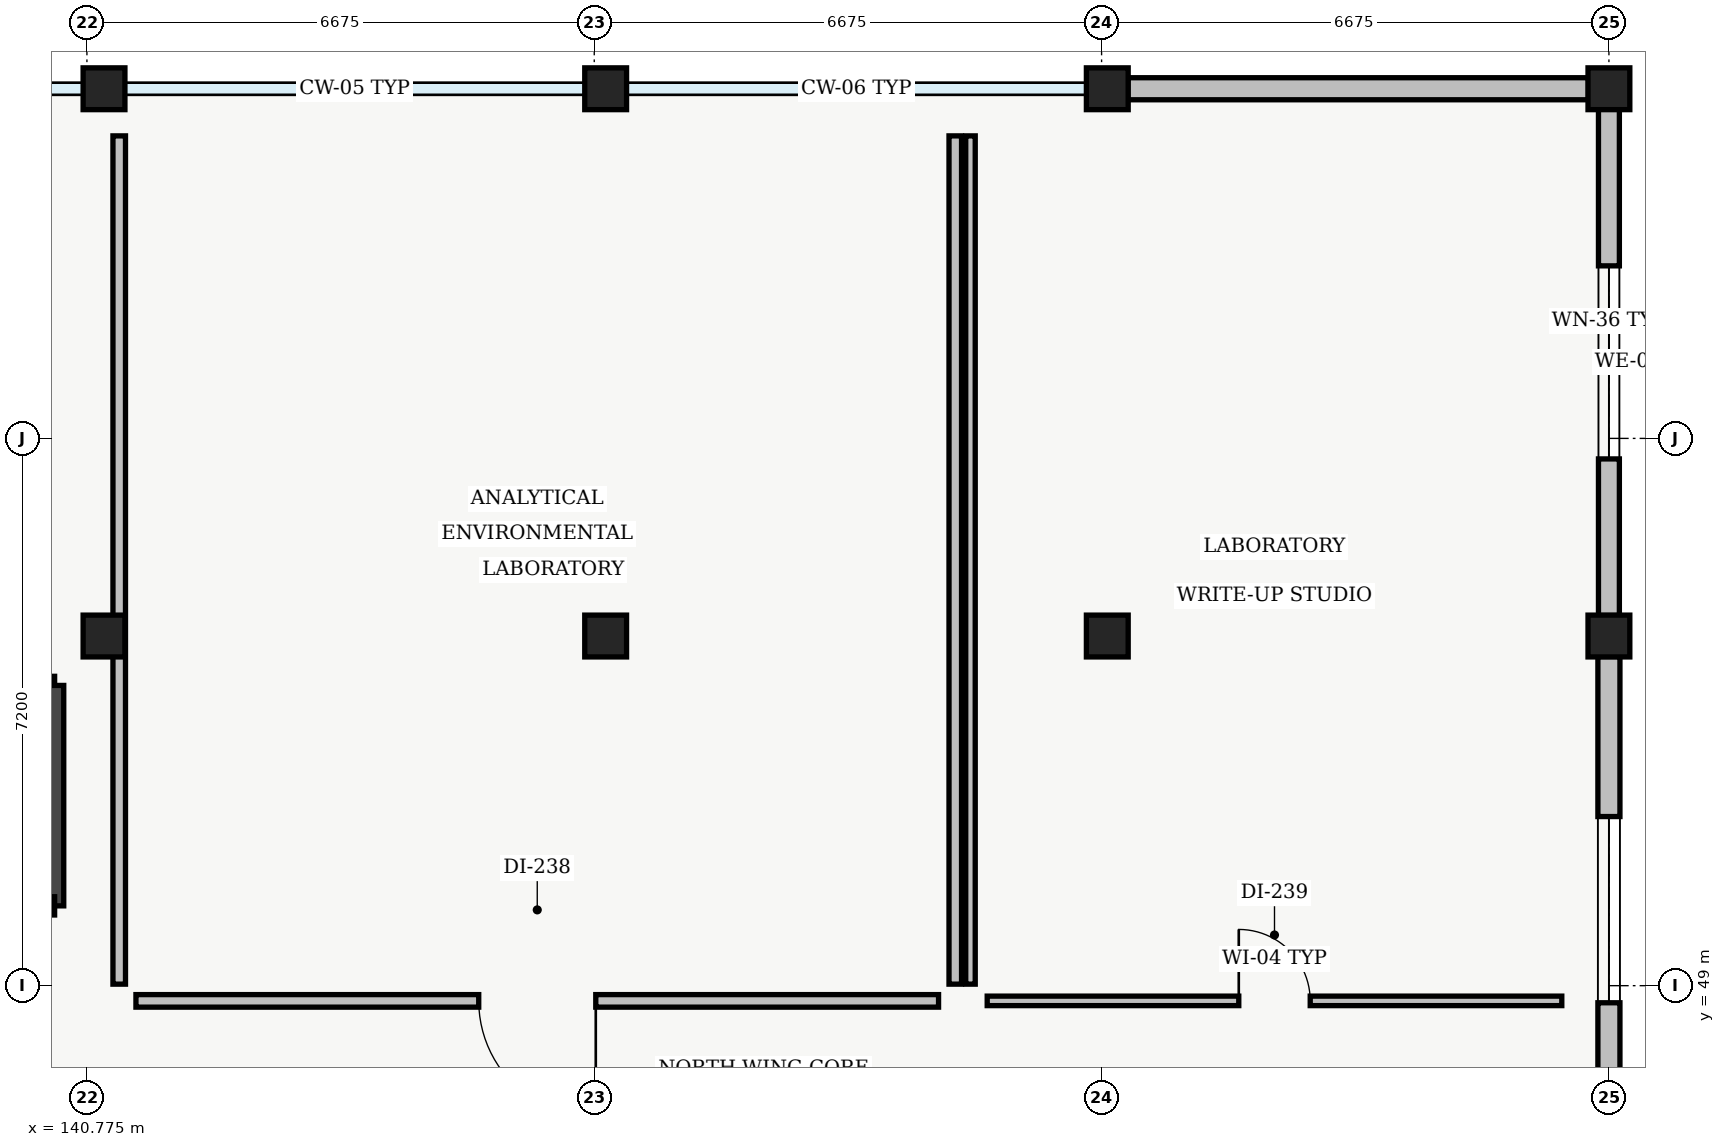
"""IFC4 building model, lengths in metres.
Left out: names, types, materials, properties, quantities, classifications, styles, units other than length and angle.
Written with IfcOpenShell. Run it as: python <this file> out.ifc"""

import sys

from ifc_helpers import new_model, si_unit, direction, frame, frame_2d, origin, origin_2d, place, context, subcontext, project, spatial, rectangle, extrude, element, fill, save


model = new_model("IFC4")
c1 = context("Model", 3, precision=1e-05, world=origin(), true_north=direction((0.0, 1.0)))
c2 = subcontext(c1, "Body", "Model", "MODEL_VIEW")
j1 = project(units=[si_unit("LENGTHUNIT", "METRE"), si_unit("PLANEANGLEUNIT", "RADIAN")], contexts=[c1])
p1 = place(None, origin())
s1 = spatial("IfcSite", under=j1, at=p1, CompositionType="ELEMENT")
p2 = place(p1, origin())
s2 = spatial("IfcBuilding", under=s1, at=p2, CompositionType="ELEMENT")
p3 = place(p2, frame((0.0, 0.0, 23.1)))
s3 = spatial("IfcBuildingStorey", under=s2, at=p3, CompositionType="ELEMENT", Elevation=23.1)
for number, where, z_axis, x_axis in (
    (1, (141.0, 53.6, 0.0), (0.0, 0.0, 1.0), (1.0, 0.0, 0.0)),
    (2, (141.0, 60.8, 0.0), (0.0, 0.0, 1.0), (1.0, 0.0, 0.0)),
    (3, (147.6, 53.6, 0.0), (0.0, 0.0, 1.0), (1.0, 0.0, 0.0)),
    (4, (147.6, 60.8, 0.0), (0.0, 0.0, 1.0), (1.0, 0.0, 0.0)),
    (5, (154.2, 53.6, 0.0), (0.0, 0.0, 1.0), (1.0, 0.0, 0.0)),
    (6, (154.2, 60.8, 0.0), (0.0, 0.0, 1.0), (1.0, 0.0, 0.0)),
    (7, (160.8, 53.6, 0.0), (0.0, 0.0, 1.0), (1.0, 0.0, 0.0)),
    (8, (160.8, 60.8, 0.0), (0.0, 0.0, 1.0), (1.0, 0.0, 0.0)),
):
    element("IfcColumn", number, at=place(p3, frame(where, z_axis=z_axis, x_axis=x_axis)), inside=s3, PredefinedType="COLUMN", context=c2, shape_type="SweptSolid", body=[
        extrude(rectangle(XDim=0.55, YDim=0.55, at=origin_2d()), origin(), (0.0, 0.0, 1.0), 4.29),
    ])
p4 = place(p3, frame((154.47, 60.8, 0.0), z_axis=(0.0, 0.0, 1.0), x_axis=(1.0, 0.0, 0.0)))
e9 = element("IfcWall", 9, at=p4, inside=s3, PredefinedType="STANDARD", context=c2, shape_type="SweptSolid", body=[
    extrude(rectangle(XDim=6.06, YDim=0.29, at=frame_2d((3.03, 0.0))), origin(), (0.0, 0.0, 1.0), 3.775),
])
p5 = place(p3, frame((160.8, 60.53, 0.0), z_axis=(0.0, 0.0, 1.0), x_axis=(0.0, -1.0, 0.0)))
e10 = element("IfcWall", 10, at=p5, inside=s3, PredefinedType="STANDARD", context=c2, shape_type="SweptSolid", body=[
    extrude(rectangle(XDim=6.66, YDim=0.275, at=frame_2d((3.33, 0.0))), origin(), (0.0, 0.0, 1.0), 3.775),
])
p6 = place(p5, frame((2.06, 0.0, 0.95)))
e11 = element("IfcOpeningElement", 11, at=p6, cuts=e10, PredefinedType="OPENING", context=c2, shape_type="SweptSolid", body=[
    extrude(rectangle(XDim=2.54, YDim=1.4, at=frame_2d((1.27, 0.7))), frame((0.0, 0.137, 0.0), z_axis=(0.0, -1.0, 0.0), x_axis=(1.0, 0.0, 0.0)), (0.0, 0.0, 1.0), 0.275),
])
p7 = place(p3, frame((160.8, 53.33, 0.0), z_axis=(0.0, 0.0, 1.0), x_axis=(0.0, -1.0, 0.0)))
e12 = element("IfcWall", 12, at=p7, inside=s3, PredefinedType="STANDARD", context=c2, shape_type="SweptSolid", body=[
    extrude(rectangle(XDim=6.66, YDim=0.29, at=frame_2d((3.33, 0.0))), origin(), (0.0, 0.0, 1.0), 3.775),
])
p8 = place(p7, frame((2.105, 0.0, 0.95)))
e13 = element("IfcOpeningElement", 13, at=p8, cuts=e12, PredefinedType="OPENING", context=c2, shape_type="SweptSolid", body=[
    extrude(rectangle(XDim=2.45, YDim=1.38, at=frame_2d((1.225, 0.69))), frame((0.0, 0.145, 0.0), z_axis=(0.0, -1.0, 0.0), x_axis=(1.0, 0.0, 0.0)), (0.0, 0.0, 1.0), 0.29),
])
p9 = place(p3, frame((138.05, 52.95, 0.0), z_axis=(0.0, 0.0, 1.0), x_axis=(1.0, 0.0, 0.0)))
e14 = element("IfcWall", 14, at=p9, inside=s3, PredefinedType="SHEAR", context=c2, shape_type="SweptSolid", body=[
    extrude(rectangle(XDim=2.3, YDim=0.24, at=frame_2d((1.15, 0.0))), origin(), (0.0, 0.0, 1.0), 4.28),
])
p10 = place(p3, frame((140.35, 52.95, 0.0), z_axis=(0.0, 0.0, 1.0), x_axis=(0.0, -1.0, 0.0)))
e15 = element("IfcWall", 15, at=p10, inside=s3, PredefinedType="SHEAR", context=c2, shape_type="SweptSolid", body=[
    extrude(rectangle(XDim=2.9, YDim=0.24, at=frame_2d((1.45, 0.0))), origin(), (0.0, 0.0, 1.0), 4.28),
])
p11 = place(p3, frame((140.35, 50.05, 0.0), z_axis=(0.0, 0.0, 1.0), x_axis=(-1.0, 0.0, 0.0)))
e16 = element("IfcWall", 16, at=p11, inside=s3, PredefinedType="SHEAR", context=c2, shape_type="SweptSolid", body=[
    extrude(rectangle(XDim=2.3, YDim=0.24, at=frame_2d((1.15, 0.0))), origin(), (0.0, 0.0, 1.0), 4.28),
])
p12 = place(p11, frame((0.425, 0.0, 0.0)))
e17 = element("IfcOpeningElement", 17, at=p12, cuts=e16, PredefinedType="OPENING", context=c2, shape_type="SweptSolid", body=[
    extrude(rectangle(XDim=1.45, YDim=2.3, at=frame_2d((0.725, 1.15))), frame((0.0, 0.12, 0.0), z_axis=(0.0, -1.0, 0.0), x_axis=(1.0, 0.0, 0.0)), (0.0, 0.0, 1.0), 0.24),
])
p13 = place(p3, frame((141.42, 48.8, 0.0), z_axis=(0.0, 0.0, 1.0), x_axis=(1.0, 0.0, 0.0)))
e18 = element("IfcWall", 18, at=p13, inside=s3, PredefinedType="PARTITIONING", context=c2, shape_type="SweptSolid", body=[
    extrude(rectangle(XDim=10.56, YDim=0.165, at=frame_2d((5.28, 0.0))), origin(), (0.0, 0.0, 1.0), 3.825),
])
p14 = place(p13, frame((4.51, 0.0, 0.0)))
e19 = element("IfcOpeningElement", 19, at=p14, cuts=e18, PredefinedType="OPENING", context=c2, shape_type="SweptSolid", body=[
    extrude(rectangle(XDim=1.54, YDim=2.14, at=frame_2d((0.77, 1.07))), frame((0.0, 0.083, 0.0), z_axis=(0.0, -1.0, 0.0), x_axis=(1.0, 0.0, 0.0)), (0.0, 0.0, 1.0), 0.165),
])
p15 = place(p3, frame((152.2, 49.02, 0.0), z_axis=(0.0, 0.0, 1.0), x_axis=(0.0, 1.0, 0.0)))
e20 = element("IfcWall", 20, at=p15, inside=s3, PredefinedType="PARTITIONING", context=c2, shape_type="SweptSolid", body=[
    extrude(rectangle(XDim=11.16, YDim=0.165, at=frame_2d((5.58, 0.0))), origin(), (0.0, 0.0, 1.0), 3.95),
])
p16 = place(p3, frame((141.2, 60.18, 0.0), z_axis=(0.0, 0.0, 1.0), x_axis=(0.0, -1.0, 0.0)))
e21 = element("IfcWall", 21, at=p16, inside=s3, PredefinedType="PARTITIONING", context=c2, shape_type="SweptSolid", body=[
    extrude(rectangle(XDim=11.16, YDim=0.165, at=frame_2d((5.58, 0.0))), origin(), (0.0, 0.0, 1.0), 3.675),
])
p17 = place(p3, frame((152.62, 48.8, 0.0), z_axis=(0.0, 0.0, 1.0), x_axis=(1.0, 0.0, 0.0)))
e22 = element("IfcWall", 22, at=p17, inside=s3, PredefinedType="PARTITIONING", context=c2, shape_type="SweptSolid", body=[
    extrude(rectangle(XDim=7.56, YDim=0.125, at=frame_2d((3.78, 0.0))), origin(), (0.0, 0.0, 1.0), 3.825),
])
p18 = place(p17, frame((3.31, 0.0, 0.0)))
e23 = element("IfcOpeningElement", 23, at=p18, cuts=e22, PredefinedType="OPENING", context=c2, shape_type="SweptSolid", body=[
    extrude(rectangle(XDim=0.94, YDim=2.12, at=frame_2d((0.47, 1.06))), frame((0.0, 0.062, 0.0), z_axis=(0.0, -1.0, 0.0), x_axis=(1.0, 0.0, 0.0)), (0.0, 0.0, 1.0), 0.125),
])
p19 = place(p3, frame((152.4, 60.18, 0.0), z_axis=(0.0, 0.0, 1.0), x_axis=(0.0, -1.0, 0.0)))
e24 = element("IfcWall", 24, at=p19, inside=s3, PredefinedType="PARTITIONING", context=c2, shape_type="SweptSolid", body=[
    extrude(rectangle(XDim=11.16, YDim=0.125, at=frame_2d((5.58, 0.0))), origin(), (0.0, 0.0, 1.0), 3.95),
])
p20 = place(p6, origin())
e25 = element("IfcWindow", 25, at=p20, inside=s3, PartitioningType="SINGLE_PANEL", PredefinedType="WINDOW", context=c2, shape_type="SweptSolid", body=[
    extrude(rectangle(XDim=2.54, YDim=1.4, at=frame_2d((1.27, 0.7))), frame((0.0, 0.03, 0.0), z_axis=(0.0, -1.0, 0.0), x_axis=(1.0, 0.0, 0.0)), (0.0, 0.0, 1.0), 0.06),
])
fill(e11, e25)
p21 = place(p8, origin())
e26 = element("IfcWindow", 26, at=p21, inside=s3, PartitioningType="SINGLE_PANEL", PredefinedType="WINDOW", context=c2, shape_type="SweptSolid", body=[
    extrude(rectangle(XDim=2.45, YDim=1.38, at=frame_2d((1.225, 0.69))), frame((0.0, 0.03, 0.0), z_axis=(0.0, -1.0, 0.0), x_axis=(1.0, 0.0, 0.0)), (0.0, 0.0, 1.0), 0.06),
])
fill(e13, e26)
p22 = place(p14, origin())
e27 = element("IfcDoor", 27, at=p22, inside=s3, OperationType="SINGLE_SWING_RIGHT", PredefinedType="DOOR", context=c2, shape_type="SweptSolid", body=[
    extrude(rectangle(XDim=1.54, YDim=2.14, at=frame_2d((0.77, 1.07))), frame((0.0, 0.025, 0.0), z_axis=(0.0, -1.0, 0.0), x_axis=(1.0, 0.0, 0.0)), (0.0, 0.0, 1.0), 0.05),
])
fill(e19, e27)
p23 = place(p18, origin())
e28 = element("IfcDoor", 28, at=p23, inside=s3, OperationType="SINGLE_SWING_LEFT", PredefinedType="DOOR", context=c2, shape_type="SweptSolid", body=[
    extrude(rectangle(XDim=0.94, YDim=2.12, at=frame_2d((0.47, 1.06))), frame((0.0, 0.025, 0.0), z_axis=(0.0, -1.0, 0.0), x_axis=(1.0, 0.0, 0.0)), (0.0, 0.0, 1.0), 0.05),
])
fill(e23, e28)
save(model, sys.argv[1])
